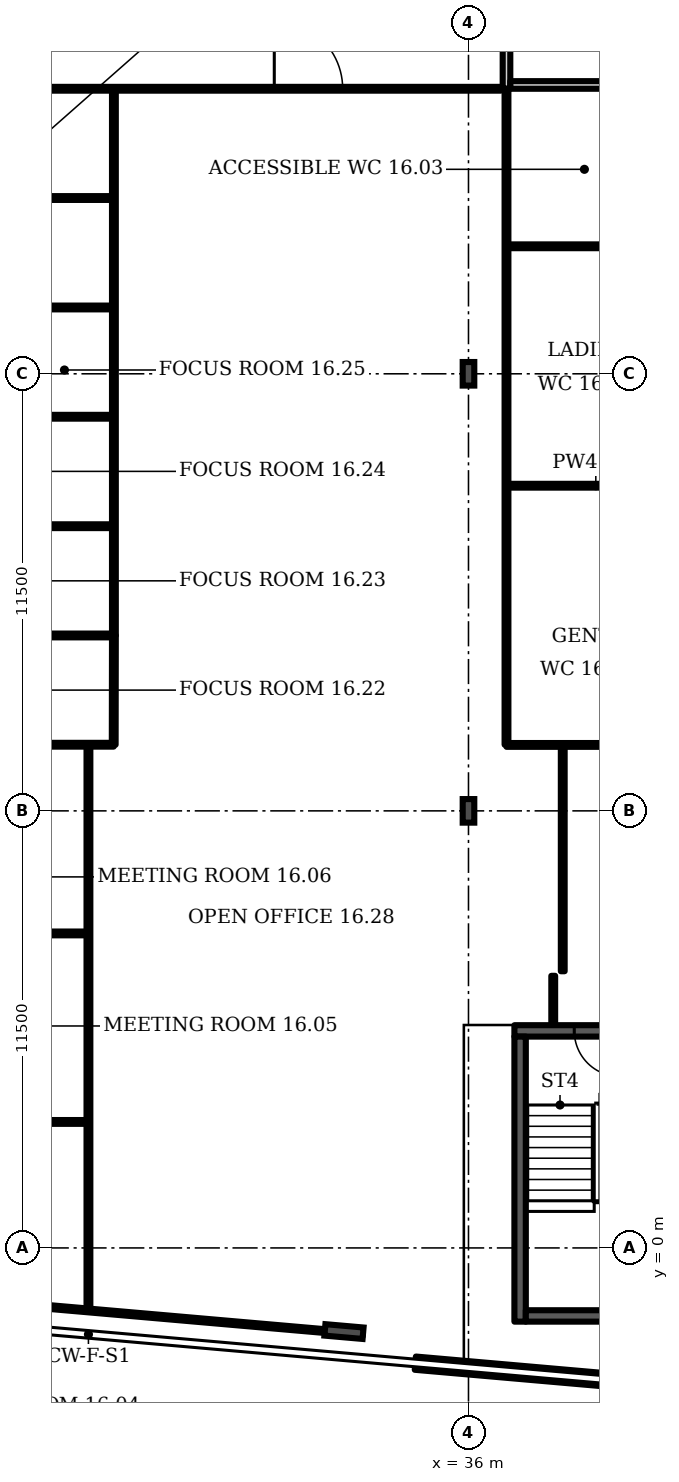
"""IFC4 building model, lengths in metres.
Left out: names, types, materials, properties, quantities, classifications, styles, units other than length and angle.
Written with IfcOpenShell. Run it as: python <this file> out.ifc"""

import sys

from ifc_helpers import new_model, si_unit, direction, frame, frame_2d, origin, origin_2d, place, context, subcontext, project, spatial, rectangle, i_section, extrude, element, fill, save


model = new_model("IFC4")
c1 = context("Model", 3, precision=1e-05, world=origin(), true_north=direction((0.0, 1.0)))
c2 = subcontext(c1, "Body", "Model", "MODEL_VIEW")
j1 = project(units=[si_unit("LENGTHUNIT", "METRE"), si_unit("PLANEANGLEUNIT", "RADIAN")], contexts=[c1])
p1 = place(None, origin())
s1 = spatial("IfcSite", under=j1, at=p1, CompositionType="ELEMENT")
p2 = place(p1, origin())
s2 = spatial("IfcBuilding", under=s1, at=p2, CompositionType="ELEMENT")
p3 = place(p2, frame((0.0, 0.0, 77.5)))
s3 = spatial("IfcBuildingStorey", under=s2, at=p3, CompositionType="ELEMENT", Elevation=77.5)
p4 = place(p3, frame((32.724, -2.2, 0.0), z_axis=(0.0, 0.0, 1.0), x_axis=(-0.087156, -0.996198, 0.0)))
e1 = element("IfcColumn", 1, at=p4, inside=s3, PredefinedType="COLUMN", context=c2, shape_type="SweptSolid", body=[
    extrude(i_section(OverallWidth=0.302, OverallDepth=1.008, WebThickness=0.021, FlangeThickness=0.04, FilletRadius=0.03, at=origin_2d()), origin(), (0.0, 0.0, 1.0), 3.6),
])
for number, where, z_axis, x_axis in (
    (2, (36.0, 11.5, 0.0), (0.0, 0.0, 1.0), (1.0, 0.0, 0.0)),
    (3, (36.0, 23.0, 0.0), (0.0, 0.0, 1.0), (1.0, 0.0, 0.0)),
):
    element("IfcColumn", number, at=place(p3, frame(where, z_axis=z_axis, x_axis=x_axis)), inside=s3, PredefinedType="COLUMN", context=c2, shape_type="SweptSolid", body=[
        extrude(i_section(OverallWidth=0.305, OverallDepth=0.62, WebThickness=0.021, FlangeThickness=0.04, FilletRadius=0.027, at=origin_2d()), origin(), (0.0, 0.0, 1.0), 3.6),
    ])
p5 = place(p3, frame((34.601, -3.032, 0.0), z_axis=(0.0, 0.0, 1.0), x_axis=(0.996193, -0.087148, 0.0)))
e4 = element("IfcWall", 4, at=p5, inside=s3, PredefinedType="SOLIDWALL", context=c2, shape_type="SweptSolid", body=[
    extrude(rectangle(XDim=11.458, YDim=0.35, at=frame_2d((5.729, 0.0))), origin(), (0.0, 0.0, 1.0), 1.0),
])
p6 = place(p3, frame((37.0, 30.5, 0.0), z_axis=(0.0, 0.0, 1.0), x_axis=(0.0, 1.0, 0.0)))
e5 = element("IfcWall", 5, at=p6, inside=s3, PredefinedType="PARTITIONING", context=c2, shape_type="SweptSolid", body=[
    extrude(rectangle(XDim=3.5, YDim=0.2, at=frame_2d((1.75, 0.0))), origin(), (0.0, 0.0, 1.0), 3.2),
])
p7 = place(p6, frame((1.2, 0.0, 0.0)))
e6 = element("IfcOpeningElement", 6, at=p7, cuts=e5, PredefinedType="OPENING", context=c2, shape_type="SweptSolid", body=[
    extrude(rectangle(XDim=1.1, YDim=2.1, at=frame_2d((0.55, 1.05))), frame((0.0, 0.11, 0.0), z_axis=(0.0, -1.0, 0.0), x_axis=(1.0, 0.0, 0.0)), (0.0, 0.0, 1.0), 0.22),
])
p8 = place(p3, frame((37.1, 30.6, 0.0), z_axis=(0.0, 0.0, 1.0), x_axis=(1.0, 0.0, 0.0)))
e7 = element("IfcWall", 7, at=p8, inside=s3, PredefinedType="PARTITIONING", context=c2, shape_type="SweptSolid", body=[
    extrude(rectangle(XDim=2.8, YDim=0.2, at=frame_2d((1.4, 0.0))), origin(), (0.0, 0.0, 1.0), 3.2),
])
p9 = place(p3, frame((37.208, 5.711, 0.0), z_axis=(0.0, 0.0, 1.0), x_axis=(1.0, 0.0, 0.0)))
e8 = element("IfcWall", 8, at=p9, inside=s3, PredefinedType="SHEAR", context=c2, shape_type="SweptSolid", body=[
    extrude(rectangle(XDim=4.35, YDim=0.3, at=frame_2d((2.175, 0.0))), origin(), (0.0, 0.0, 1.0), 3.2),
])
p10 = place(p9, frame((1.575, 0.0, 0.0)))
e9 = element("IfcOpeningElement", 9, at=p10, cuts=e8, PredefinedType="OPENING", context=c2, shape_type="SweptSolid", body=[
    extrude(rectangle(XDim=1.2, YDim=2.1, at=frame_2d((0.6, 1.05))), frame((0.0, 0.16, 0.0), z_axis=(0.0, -1.0, 0.0), x_axis=(1.0, 0.0, 0.0)), (0.0, 0.0, 1.0), 0.32),
])
for number, where, z_axis, x_axis in (
    (10, (21.94, 3.315, 0.0), (0.0, 0.0, 1.0), (1.0, 0.0, 0.0)),
    (11, (21.94, 8.275, 0.0), (0.0, 0.0, 1.0), (1.0, 0.0, 0.0)),
):
    element("IfcWall", number, at=place(p3, frame(where, z_axis=z_axis, x_axis=x_axis)), inside=s3, PredefinedType="PARTITIONING", context=c2, shape_type="SweptSolid", body=[
        extrude(rectangle(XDim=4.06, YDim=0.1, at=frame_2d((2.03, 0.0))), origin(), (0.0, 0.0, 1.0), 3.2),
    ])
for number, where, z_axis, x_axis in (
    (12, (21.94, 13.24, 0.0), (0.0, 0.0, 1.0), (1.0, 0.0, 0.0)),
    (13, (21.94, 16.115, 0.0), (0.0, 0.0, 1.0), (1.0, 0.0, 0.0)),
    (14, (21.94, 18.99, 0.0), (0.0, 0.0, 1.0), (1.0, 0.0, 0.0)),
    (15, (21.94, 21.87, 0.0), (0.0, 0.0, 1.0), (1.0, 0.0, 0.0)),
    (16, (21.94, 24.745, 0.0), (0.0, 0.0, 1.0), (1.0, 0.0, 0.0)),
    (17, (21.94, 27.625, 0.0), (0.0, 0.0, 1.0), (1.0, 0.0, 0.0)),
):
    element("IfcWall", number, at=place(p3, frame(where, z_axis=z_axis, x_axis=x_axis)), inside=s3, PredefinedType="PARTITIONING", context=c2, shape_type="SweptSolid", body=[
        extrude(rectangle(XDim=4.725, YDim=0.1, at=frame_2d((2.363, 0.0))), origin(), (0.0, 0.0, 1.0), 3.2),
    ])
p11 = place(p3, frame((21.94, 30.5, 0.0), z_axis=(0.0, 0.0, 1.0), x_axis=(1.0, 0.0, 0.0)))
e18 = element("IfcWall", 18, at=p11, inside=s3, PredefinedType="PARTITIONING", context=c2, shape_type="SweptSolid", body=[
    extrude(rectangle(XDim=14.91, YDim=0.1, at=frame_2d((7.455, 0.0))), origin(), (0.0, 0.0, 1.0), 3.2),
])
p12 = place(p11, frame((0.345, 0.0, 0.0)))
e19 = element("IfcOpeningElement", 19, at=p12, cuts=e18, PredefinedType="OPENING", context=c2, shape_type="SweptSolid", body=[
    extrude(rectangle(XDim=1.0, YDim=2.1, at=frame_2d((0.5, 1.05))), frame((0.0, 0.06, 0.0), z_axis=(0.0, -1.0, 0.0), x_axis=(1.0, 0.0, 0.0)), (0.0, 0.0, 1.0), 0.12),
])
p13 = place(p11, frame((8.95, 0.0, 0.0)))
e20 = element("IfcOpeningElement", 20, at=p13, cuts=e18, PredefinedType="OPENING", context=c2, shape_type="SweptSolid", body=[
    extrude(rectangle(XDim=1.8, YDim=2.1, at=frame_2d((0.9, 1.05))), frame((0.0, 0.06, 0.0), z_axis=(0.0, -1.0, 0.0), x_axis=(1.0, 0.0, 0.0)), (0.0, 0.0, 1.0), 0.12),
])
p14 = place(p3, frame((26.0, -1.645, 0.0), z_axis=(0.0, 0.0, 1.0), x_axis=(0.0, 1.0, 0.0)))
e21 = element("IfcWall", 21, at=p14, inside=s3, PredefinedType="PARTITIONING", context=c2, shape_type="SweptSolid", body=[
    extrude(rectangle(XDim=14.885, YDim=0.1, at=frame_2d((7.442, 0.0))), origin(), (0.0, 0.0, 1.0), 3.2),
])
p15 = place(p3, frame((26.665, 13.24, 0.0), z_axis=(0.0, 0.0, 1.0), x_axis=(0.001698, 0.999995, 0.0)))
e22 = element("IfcWall", 22, at=p15, inside=s3, PredefinedType="PARTITIONING", context=c2, shape_type="SweptSolid", body=[
    extrude(rectangle(XDim=2.875, YDim=0.1, at=frame_2d((1.438, 0.0))), origin(), (0.0, 0.0, 1.0), 3.2),
])
p16 = place(p3, frame((26.67, 16.115, 0.0), z_axis=(0.0, 0.0, 1.0), x_axis=(0.0, 1.0, 0.0)))
e23 = element("IfcWall", 23, at=p16, inside=s3, PredefinedType="PARTITIONING", context=c2, shape_type="SweptSolid", body=[
    extrude(rectangle(XDim=14.385, YDim=0.1, at=frame_2d((7.192, 0.0))), origin(), (0.0, 0.0, 1.0), 3.2),
])
p17 = place(p3, frame((33.22, -2.275, 0.0), z_axis=(0.0, 0.0, 1.0), x_axis=(-0.996212, 0.086913, 0.0)))
e24 = element("IfcWall", 24, at=p17, inside=s3, PredefinedType="PARTITIONING", context=c2, shape_type="SweptSolid", body=[
    extrude(rectangle(XDim=11.323, YDim=0.1, at=frame_2d((5.662, 0.0))), origin(), (0.0, 0.0, 1.0), 2.58),
])
p18 = place(p3, frame((37.0, 13.235, 0.0), z_axis=(0.0, 0.0, 1.0), x_axis=(1.0, 0.0, 0.0)))
e25 = element("IfcWall", 25, at=p18, inside=s3, PredefinedType="PARTITIONING", context=c2, shape_type="SweptSolid", body=[
    extrude(rectangle(XDim=6.49, YDim=0.1, at=frame_2d((3.245, 0.0))), origin(), (0.0, 0.0, 1.0), 3.2),
])
p19 = place(p3, frame((37.0, 13.24, 0.0), z_axis=(0.0, 0.0, 1.0), x_axis=(0.0, 1.0, 0.0)))
e26 = element("IfcWall", 26, at=p19, inside=s3, PredefinedType="PARTITIONING", context=c2, shape_type="SweptSolid", body=[
    extrude(rectangle(XDim=17.26, YDim=0.1, at=frame_2d((8.63, 0.0))), origin(), (0.0, 0.0, 1.0), 3.2),
])
for number, where, z_axis, x_axis in (
    (27, (37.0, 20.055, 0.0), (0.0, 0.0, 1.0), (1.0, 0.0, 0.0)),
    (28, (37.0, 26.355, 0.0), (0.0, 0.0, 1.0), (1.0, 0.0, 0.0)),
):
    element("IfcWall", number, at=place(p3, frame(where, z_axis=z_axis, x_axis=x_axis)), inside=s3, PredefinedType="PARTITIONING", context=c2, shape_type="SweptSolid", body=[
        extrude(rectangle(XDim=4.7, YDim=0.1, at=frame_2d((2.35, 0.0))), origin(), (0.0, 0.0, 1.0), 3.2),
    ])
p20 = place(p3, frame((38.23, 5.881, 0.0), z_axis=(0.0, 0.0, 1.0), x_axis=(0.0, 1.0, 0.0)))
e29 = element("IfcWall", 29, at=p20, inside=s3, PredefinedType="PARTITIONING", context=c2, shape_type="SweptSolid", body=[
    extrude(rectangle(XDim=1.279, YDim=0.1, at=frame_2d((0.64, 0.0))), origin(), (0.0, 0.0, 1.0), 3.2),
])
p21 = place(p3, frame((38.48, 7.28, 0.0), z_axis=(0.0, 0.0, 1.0), x_axis=(0.0, 1.0, 0.0)))
e30 = element("IfcWall", 30, at=p21, inside=s3, PredefinedType="PARTITIONING", context=c2, shape_type="SweptSolid", body=[
    extrude(rectangle(XDim=5.955, YDim=0.1, at=frame_2d((2.978, 0.0))), origin(), (0.0, 0.0, 1.0), 3.2),
])
p22 = place(p3, frame((37.358, -1.939, 0.0), z_axis=(0.0, 0.0, 1.0), x_axis=(0.0, 1.0, 0.0)))
e31 = element("IfcWall", 31, at=p22, inside=s3, PredefinedType="SHEAR", context=c2, shape_type="SweptSolid", body=[
    extrude(rectangle(XDim=7.5, YDim=0.3, at=frame_2d((3.75, 0.0))), origin(), (0.0, 0.0, 1.0), 3.2),
])
p23 = place(p3, frame((37.508, -1.789, 0.0), z_axis=(0.0, 0.0, 1.0), x_axis=(1.0, 0.0, 0.0)))
e32 = element("IfcWall", 32, at=p23, inside=s3, PredefinedType="SHEAR", context=c2, shape_type="SweptSolid", body=[
    extrude(rectangle(XDim=3.75, YDim=0.3, at=frame_2d((1.875, 0.0))), origin(), (0.0, 0.0, 1.0), 3.2),
])
p24 = place(p10, origin())
e33 = element("IfcDoor", 33, at=p24, inside=s3, OperationType="SINGLE_SWING_RIGHT", PredefinedType="DOOR", context=c2, shape_type="SweptSolid", body=[
    extrude(rectangle(XDim=1.2, YDim=2.1, at=frame_2d((0.6, 1.05))), frame((0.0, 0.025, 0.0), z_axis=(0.0, -1.0, 0.0), x_axis=(1.0, 0.0, 0.0)), (0.0, 0.0, 1.0), 0.05),
])
fill(e9, e33)
p25 = place(p13, origin())
e34 = element("IfcDoor", 34, at=p25, inside=s3, OperationType="DOUBLE_DOOR_SINGLE_SWING", PredefinedType="DOOR", context=c2, shape_type="SweptSolid", body=[
    extrude(rectangle(XDim=1.8, YDim=2.1, at=frame_2d((0.9, 1.05))), frame((0.0, 0.025, 0.0), z_axis=(0.0, -1.0, 0.0), x_axis=(1.0, 0.0, 0.0)), (0.0, 0.0, 1.0), 0.05),
])
fill(e20, e34)
save(model, sys.argv[1])
